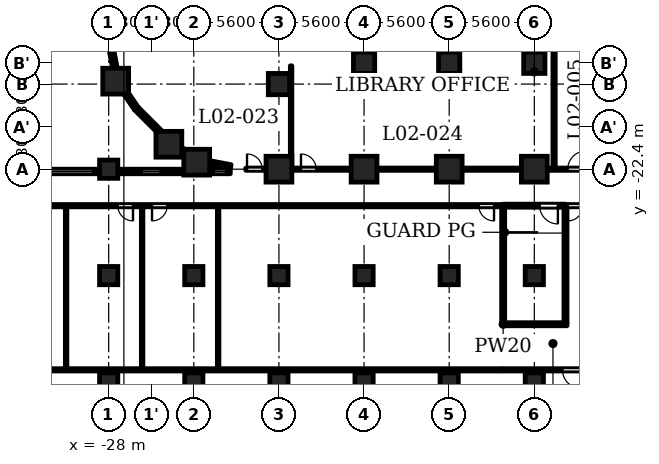
"""IFC4 building model, lengths in metres.
Left out: names, types, materials, properties, quantities, classifications, styles, units other than length and angle.
Written with IfcOpenShell. Run it as: python <this file> out.ifc"""

import sys

from ifc_helpers import new_model, si_unit, direction, frame, frame_2d, origin, origin_2d, place, context, subcontext, project, spatial, polyline, rectangle, circle, outline, extrude, element, fill, save


model = new_model("IFC4")
c1 = context("Model", 3, precision=1e-05, world=origin(), true_north=direction((0.0, 1.0)))
c2 = subcontext(c1, "Body", "Model", "MODEL_VIEW")
j1 = project(units=[si_unit("LENGTHUNIT", "METRE"), si_unit("PLANEANGLEUNIT", "RADIAN")], contexts=[c1])
p1 = place(None, origin())
s1 = spatial("IfcSite", under=j1, at=p1, CompositionType="ELEMENT")
p2 = place(p1, origin())
s2 = spatial("IfcBuilding", under=s1, at=p2, CompositionType="ELEMENT")
p3 = place(p2, frame((0.0, 0.0, 11.3)))
s3 = spatial("IfcBuildingStorey", under=s2, at=p3, CompositionType="ELEMENT", Elevation=11.3)
for number, where, z_axis, x_axis in (
    (1, (-22.209, -21.938, 0.0), (0.0, 0.0, 1.0), (1.0, 0.0, 0.0)),
    (2, (-16.8, -22.4, 0.0), (0.0, 0.0, 1.0), (1.0, 0.0, 0.0)),
    (3, (-11.2, -22.4, 0.0), (0.0, 0.0, 1.0), (1.0, 0.0, 0.0)),
    (4, (-5.6, -22.4, 0.0), (0.0, 0.0, 1.0), (1.0, 0.0, 0.0)),
    (5, (0.0, -22.4, 0.0), (0.0, 0.0, 1.0), (1.0, 0.0, 0.0)),
    (6, (-27.538, -16.609, 0.0), (0.0, 0.0, 1.0), (1.0, 0.0, 0.0)),
    (7, (-24.04, -20.76, 0.0), (0.0, 0.0, 1.0), (1.0, 0.0, 0.0)),
):
    element("IfcColumn", number, at=place(p3, frame(where, z_axis=z_axis, x_axis=x_axis)), inside=s3, PredefinedType="COLUMN", context=c2, shape_type="SweptSolid", body=[
        extrude(rectangle(XDim=1.7, YDim=1.7, at=origin_2d()), origin(), (0.0, 0.0, 1.0), 4.8),
    ])
for number, where, z_axis, x_axis in (
    (8, (-16.8, -16.8, 0.0), (0.0, 0.0, 1.0), (1.0, 0.0, 0.0)),
    (9, (-11.2, -15.4, 0.0), (0.0, 0.0, 1.0), (1.0, 0.0, 0.0)),
    (10, (-5.6, -15.4, 0.0), (0.0, 0.0, 1.0), (1.0, 0.0, 0.0)),
    (11, (0.0, -15.4, 0.0), (0.0, 0.0, 1.0), (1.0, 0.0, 0.0)),
):
    element("IfcColumn", number, at=place(p3, frame(where, z_axis=z_axis, x_axis=x_axis)), inside=s3, PredefinedType="COLUMN", context=c2, shape_type="SweptSolid", body=[
        extrude(rectangle(XDim=1.4, YDim=1.4, at=origin_2d()), origin(), (0.0, 0.0, 1.0), 4.8),
    ])
for number, where, z_axis, x_axis in (
    (12, (-28.0, -29.4, 0.0), (0.0, 0.0, 1.0), (1.0, 0.0, 0.0)),
    (13, (-22.4, -29.4, 0.0), (0.0, 0.0, 1.0), (1.0, 0.0, 0.0)),
    (14, (-16.8, -29.4, 0.0), (0.0, 0.0, 1.0), (1.0, 0.0, 0.0)),
    (15, (-11.2, -29.4, 0.0), (0.0, 0.0, 1.0), (1.0, 0.0, 0.0)),
    (16, (-5.6, -29.4, 0.0), (0.0, 0.0, 1.0), (1.0, 0.0, 0.0)),
    (17, (0.0, -29.4, 0.0), (0.0, 0.0, 1.0), (1.0, 0.0, 0.0)),
    (18, (-28.0, -36.4, 0.0), (0.0, 0.0, 1.0), (1.0, 0.0, 0.0)),
    (19, (-22.4, -36.4, 0.0), (0.0, 0.0, 1.0), (1.0, 0.0, 0.0)),
    (20, (-16.8, -36.4, 0.0), (0.0, 0.0, 1.0), (1.0, 0.0, 0.0)),
    (21, (-11.2, -36.4, 0.0), (0.0, 0.0, 1.0), (1.0, 0.0, 0.0)),
    (22, (-5.6, -36.4, 0.0), (0.0, 0.0, 1.0), (1.0, 0.0, 0.0)),
    (23, (0.0, -36.4, 0.0), (0.0, 0.0, 1.0), (1.0, 0.0, 0.0)),
    (24, (-28.0, -22.4, 0.0), (0.0, 0.0, 1.0), (1.0, 0.0, 0.0)),
):
    element("IfcColumn", number, at=place(p3, frame(where, z_axis=z_axis, x_axis=x_axis)), inside=s3, PredefinedType="COLUMN", context=c2, shape_type="SweptSolid", body=[
        extrude(circle(Radius=0.6, at=origin_2d()), origin(), (0.0, 0.0, 1.0), 4.8),
    ])
for number, where, z_axis, x_axis in (
    (25, (-27.853, -14.372, 0.0), (0.0, 0.0, 1.0), (0.187, -0.982, 0.0)),
    (26, (-26.969, -17.25, 0.0), (0.0, 0.0, 1.0), (0.562, -0.827, 0.0)),
):
    element("IfcWall", number, at=place(p3, frame(where, z_axis=z_axis, x_axis=x_axis)), inside=s3, PredefinedType="SOLIDWALL", context=c2, shape_type="SweptSolid", body=[
        extrude(rectangle(XDim=1.406, YDim=0.3, at=frame_2d((0.703, 0.0))), origin(), (0.0, 0.0, 1.0), 3.55),
    ])
p4 = place(p3, frame((-26.197, -18.391, 0.0), z_axis=(0.0, 0.0, 1.0), x_axis=(0.707054835785, -0.707158722772, 0.0)))
e27 = element("IfcWall", 27, at=p4, inside=s3, PredefinedType="SOLIDWALL", context=c2, shape_type="SweptSolid", body=[
    extrude(rectangle(XDim=2.35, YDim=0.3, at=frame_2d((1.175, 0.0))), origin(), (0.0, 0.0, 1.0), 3.55),
])
p5 = place(p3, frame((-23.244, -21.101, 0.0), z_axis=(0.0, 0.0, 1.0), x_axis=(0.827135885329, -0.562001981492, 0.0)))
e28 = element("IfcWall", 28, at=p5, inside=s3, PredefinedType="SOLIDWALL", context=c2, shape_type="SweptSolid", body=[
    extrude(rectangle(XDim=0.477, YDim=0.3, at=frame_2d((0.239, 0.0))), origin(), (0.0, 0.0, 1.0), 4.45),
])
p6 = place(p3, frame((-21.353, -21.989, 0.0), z_axis=(0.0, 0.0, 1.0), x_axis=(0.98229142023, -0.187359455971, 0.0)))
e29 = element("IfcWall", 29, at=p6, inside=s3, PredefinedType="SOLIDWALL", context=c2, shape_type="SweptSolid", body=[
    extrude(rectangle(XDim=1.406, YDim=0.3, at=frame_2d((0.703, 0.0))), origin(), (0.0, 0.0, 1.0), 3.55),
])
p7 = place(p3, frame((-20.0, -22.55, 0.0), z_axis=(0.0, 0.0, 1.0), x_axis=(-1.0, 0.0, 0.0)))
e30 = element("IfcWall", 30, at=p7, inside=s3, PredefinedType="SOLIDWALL", context=c2, shape_type="SweptSolid", body=[
    extrude(rectangle(XDim=1.359, YDim=0.3, at=frame_2d((0.679, 0.0))), origin(), (0.0, 0.0, 1.0), 3.55),
])
p8 = place(p7, frame((0.279, 0.0, 0.6)))
e31 = element("IfcOpeningElement", 31, at=p8, cuts=e30, PredefinedType="OPENING", context=c2, shape_type="SweptSolid", body=[
    extrude(rectangle(XDim=0.8, YDim=1.55, at=frame_2d((0.4, 0.775))), frame((0.0, 0.16, 0.0), z_axis=(0.0, -1.0, 0.0), x_axis=(1.0, 0.0, 0.0)), (0.0, 0.0, 1.0), 0.32),
])
p9 = place(p3, frame((-23.059, -22.55, 0.0), z_axis=(0.0, 0.0, 1.0), x_axis=(-1.0, 0.0, 0.0)))
e32 = element("IfcWall", 32, at=p9, inside=s3, PredefinedType="SOLIDWALL", context=c2, shape_type="SweptSolid", body=[
    extrude(rectangle(XDim=4.341, YDim=0.3, at=frame_2d((2.171, 0.0))), origin(), (0.0, 0.0, 1.0), 4.45),
])
p10 = place(p9, frame((1.571, 0.0, 0.6)))
e33 = element("IfcOpeningElement", 33, at=p10, cuts=e32, PredefinedType="OPENING", context=c2, shape_type="SweptSolid", body=[
    extrude(rectangle(XDim=1.2, YDim=1.55, at=frame_2d((0.6, 0.775))), frame((0.0, 0.16, 0.0), z_axis=(0.0, -1.0, 0.0), x_axis=(1.0, 0.0, 0.0)), (0.0, 0.0, 1.0), 0.32),
])
p11 = place(p3, frame((-28.6, -22.55, 0.0), z_axis=(0.0, 0.0, 1.0), x_axis=(-1.0, 0.0, 0.0)))
e34 = element("IfcWall", 34, at=p11, inside=s3, PredefinedType="SOLIDWALL", context=c2, shape_type="SweptSolid", body=[
    extrude(rectangle(XDim=4.4, YDim=0.3, at=frame_2d((2.2, 0.0))), origin(), (0.0, 0.0, 1.0), 4.45),
])
p12 = place(p11, frame((0.4, 0.0, 1.2)))
e35 = element("IfcOpeningElement", 35, at=p12, cuts=e34, PredefinedType="OPENING", context=c2, shape_type="SweptSolid", body=[
    extrude(rectangle(XDim=3.6, YDim=0.95, at=frame_2d((1.8, 0.475))), frame((0.0, 0.16, 0.0), z_axis=(0.0, -1.0, 0.0), x_axis=(1.0, 0.0, 0.0)), (0.0, 0.0, 1.0), 0.32),
])
p13 = place(p3, frame((-44.48, -35.6, 0.0), z_axis=(0.0, 0.0, 1.0), x_axis=(1.0, 0.0, 0.0)))
e36 = element("IfcWall", 36, at=p13, inside=s3, PredefinedType="PARTITIONING", context=c2, shape_type="SweptSolid", body=[
    extrude(rectangle(XDim=42.38, YDim=0.15, at=frame_2d((21.19, 0.0))), origin(), (0.0, 0.0, 1.0), 4.45),
])
p14 = place(p3, frame((-2.05, -35.6, 0.0), z_axis=(0.0, 0.0, 1.0), x_axis=(1.0, 0.0, 0.0)))
e37 = element("IfcWall", 37, at=p14, inside=s3, PredefinedType="PARTITIONING", context=c2, shape_type="SweptSolid", body=[
    extrude(rectangle(XDim=5.6, YDim=0.15, at=frame_2d((2.8, 0.0))), origin(), (0.0, 0.0, 1.0), 4.45),
])
p15 = place(p14, frame((3.9, 0.0, 0.0)))
e38 = element("IfcOpeningElement", 38, at=p15, cuts=e37, PredefinedType="OPENING", context=c2, shape_type="SweptSolid", body=[
    extrude(rectangle(XDim=1.2, YDim=2.1, at=frame_2d((0.6, 1.05))), frame((0.0, 0.085, 0.0), z_axis=(0.0, -1.0, 0.0), x_axis=(1.0, 0.0, 0.0)), (0.0, 0.0, 1.0), 0.17),
])
p16 = place(p3, frame((-2.05, -32.6, 0.0), z_axis=(0.0, 0.0, 1.0), x_axis=(1.0, 0.0, 0.0)))
e39 = element("IfcWall", 39, at=p16, inside=s3, PredefinedType="SHEAR", context=c2, shape_type="SweptSolid", body=[
    extrude(rectangle(XDim=4.2, YDim=0.2, at=frame_2d((2.1, 0.0))), origin(), (0.0, 0.0, 1.0), 4.45),
])
p17 = place(p3, frame((-37.0, -24.8, 0.0), z_axis=(0.0, 0.0, 1.0), x_axis=(1.0, 0.0, 0.0)))
e40 = element("IfcWall", 40, at=p17, inside=s3, PredefinedType="PARTITIONING", context=c2, shape_type="SweptSolid", body=[
    extrude(rectangle(XDim=34.9, YDim=0.15, at=frame_2d((17.45, 0.0))), origin(), (0.0, 0.0, 1.0), 4.45),
])
p18 = place(p17, frame((0.65, 0.0, 0.0)))
e41 = element("IfcOpeningElement", 41, at=p18, cuts=e40, PredefinedType="OPENING", context=c2, shape_type="SweptSolid", body=[
    extrude(rectangle(XDim=1.0, YDim=2.1, at=frame_2d((0.5, 1.05))), frame((0.0, 0.085, 0.0), z_axis=(0.0, -1.0, 0.0), x_axis=(1.0, 0.0, 0.0)), (0.0, 0.0, 1.0), 0.17),
])
p19 = place(p17, frame((9.6, 0.0, 0.0)))
e42 = element("IfcOpeningElement", 42, at=p19, cuts=e40, PredefinedType="OPENING", context=c2, shape_type="SweptSolid", body=[
    extrude(rectangle(XDim=1.0, YDim=2.1, at=frame_2d((0.5, 1.05))), frame((0.0, 0.085, 0.0), z_axis=(0.0, -1.0, 0.0), x_axis=(1.0, 0.0, 0.0)), (0.0, 0.0, 1.0), 0.17),
])
p20 = place(p17, frame((11.85, 0.0, 0.0)))
e43 = element("IfcOpeningElement", 43, at=p20, cuts=e40, PredefinedType="OPENING", context=c2, shape_type="SweptSolid", body=[
    extrude(rectangle(XDim=1.0, YDim=2.1, at=frame_2d((0.5, 1.05))), frame((0.0, 0.085, 0.0), z_axis=(0.0, -1.0, 0.0), x_axis=(1.0, 0.0, 0.0)), (0.0, 0.0, 1.0), 0.17),
])
p21 = place(p17, frame((33.35, 0.0, 0.0)))
e44 = element("IfcOpeningElement", 44, at=p21, cuts=e40, PredefinedType="OPENING", context=c2, shape_type="SweptSolid", body=[
    extrude(rectangle(XDim=1.0, YDim=2.1, at=frame_2d((0.5, 1.05))), frame((0.0, 0.085, 0.0), z_axis=(0.0, -1.0, 0.0), x_axis=(1.0, 0.0, 0.0)), (0.0, 0.0, 1.0), 0.17),
])
p22 = place(p3, frame((2.05, -24.8, 0.0), z_axis=(0.0, 0.0, 1.0), x_axis=(1.0, 0.0, 0.0)))
e45 = element("IfcWall", 45, at=p22, inside=s3, PredefinedType="PARTITIONING", context=c2, shape_type="SweptSolid", body=[
    extrude(rectangle(XDim=1.5, YDim=0.15, at=frame_2d((0.75, 0.0))), origin(), (0.0, 0.0, 1.0), 4.45),
])
p23 = place(p22, frame((0.15, 0.0, 0.0)))
e46 = element("IfcOpeningElement", 46, at=p23, cuts=e45, PredefinedType="OPENING", context=c2, shape_type="SweptSolid", body=[
    extrude(rectangle(XDim=1.0, YDim=2.1, at=frame_2d((0.5, 1.05))), frame((0.0, 0.085, 0.0), z_axis=(0.0, -1.0, 0.0), x_axis=(1.0, 0.0, 0.0)), (0.0, 0.0, 1.0), 0.17),
])
p24 = place(p3, frame((-2.05, -24.8, 0.0), z_axis=(0.0, 0.0, 1.0), x_axis=(1.0, 0.0, 0.0)))
e47 = element("IfcWall", 47, at=p24, inside=s3, PredefinedType="SHEAR", context=c2, shape_type="SweptSolid", body=[
    extrude(rectangle(XDim=4.1, YDim=0.2, at=frame_2d((2.05, 0.0))), origin(), (0.0, 0.0, 1.0), 4.45),
])
p25 = place(p24, frame((2.4, 0.0, 0.0)))
e48 = element("IfcOpeningElement", 48, at=p25, cuts=e47, PredefinedType="OPENING", context=c2, shape_type="SweptSolid", body=[
    extrude(rectangle(XDim=1.2, YDim=2.1, at=frame_2d((0.6, 1.05))), frame((0.0, 0.11, 0.0), z_axis=(0.0, -1.0, 0.0), x_axis=(1.0, 0.0, 0.0)), (0.0, 0.0, 1.0), 0.22),
])
p26 = place(p3, frame((-18.98, -22.4, 0.0), z_axis=(0.0, 0.0, 1.0), x_axis=(1.0, 0.0, 0.0)))
e49 = element("IfcWall", 49, at=p26, inside=s3, PredefinedType="PARTITIONING", context=c2, shape_type="SweptSolid", body=[
    extrude(rectangle(XDim=38.211, YDim=0.15, at=frame_2d((19.105, 0.0))), origin(), (0.0, 0.0, 1.0), 3.55),
])
p27 = place(p26, frame((21.18, 0.0, 0.0)))
e50 = element("IfcOpeningElement", 50, at=p27, cuts=e49, PredefinedType="OPENING", context=c2, shape_type="SweptSolid", body=[
    extrude(rectangle(XDim=1.2, YDim=2.1, at=frame_2d((0.6, 1.05))), frame((0.0, 0.085, 0.0), z_axis=(0.0, -1.0, 0.0), x_axis=(1.0, 0.0, 0.0)), (0.0, 0.0, 1.0), 0.17),
])
p28 = place(p26, frame((0.08, 0.0, 0.0)))
e51 = element("IfcOpeningElement", 51, at=p28, cuts=e49, PredefinedType="OPENING", context=c2, shape_type="SweptSolid", body=[
    extrude(rectangle(XDim=1.0, YDim=2.1, at=frame_2d((0.5, 1.05))), frame((0.0, 0.085, 0.0), z_axis=(0.0, -1.0, 0.0), x_axis=(1.0, 0.0, 0.0)), (0.0, 0.0, 1.0), 0.17),
])
p29 = place(p26, frame((3.63, 0.0, 0.0)))
e52 = element("IfcOpeningElement", 52, at=p29, cuts=e49, PredefinedType="OPENING", context=c2, shape_type="SweptSolid", body=[
    extrude(rectangle(XDim=1.0, YDim=2.1, at=frame_2d((0.5, 1.05))), frame((0.0, 0.085, 0.0), z_axis=(0.0, -1.0, 0.0), x_axis=(1.0, 0.0, 0.0)), (0.0, 0.0, 1.0), 0.17),
])
p30 = place(p26, frame((27.93, 0.0, 0.0)))
e53 = element("IfcOpeningElement", 53, at=p30, cuts=e49, PredefinedType="OPENING", context=c2, shape_type="SweptSolid", body=[
    extrude(rectangle(XDim=0.9, YDim=2.1, at=frame_2d((0.45, 1.05))), frame((0.0, 0.085, 0.0), z_axis=(0.0, -1.0, 0.0), x_axis=(1.0, 0.0, 0.0)), (0.0, 0.0, 1.0), 0.17),
])
p31 = place(p26, frame((31.18, 0.0, 0.0)))
e54 = element("IfcOpeningElement", 54, at=p31, cuts=e49, PredefinedType="OPENING", context=c2, shape_type="SweptSolid", body=[
    extrude(rectangle(XDim=0.9, YDim=2.1, at=frame_2d((0.45, 1.05))), frame((0.0, 0.085, 0.0), z_axis=(0.0, -1.0, 0.0), x_axis=(1.0, 0.0, 0.0)), (0.0, 0.0, 1.0), 0.17),
])
p32 = place(p26, frame((33.88, 0.0, 0.0)))
e55 = element("IfcOpeningElement", 55, at=p32, cuts=e49, PredefinedType="OPENING", context=c2, shape_type="SweptSolid", body=[
    extrude(rectangle(XDim=0.9, YDim=2.1, at=frame_2d((0.45, 1.05))), frame((0.0, 0.085, 0.0), z_axis=(0.0, -1.0, 0.0), x_axis=(1.0, 0.0, 0.0)), (0.0, 0.0, 1.0), 0.17),
])
p33 = place(p26, frame((37.231, 0.0, 0.0)))
e56 = element("IfcOpeningElement", 56, at=p33, cuts=e49, PredefinedType="OPENING", context=c2, shape_type="SweptSolid", body=[
    extrude(rectangle(XDim=0.9, YDim=2.1, at=frame_2d((0.45, 1.05))), frame((0.0, 0.085, 0.0), z_axis=(0.0, -1.0, 0.0), x_axis=(1.0, 0.0, 0.0)), (0.0, 0.0, 1.0), 0.17),
])
for number, where, z_axis, x_axis in (
    (57, (-30.8, -35.525, 0.0), (0.0, 0.0, 1.0), (0.0, 1.0, 0.0)),
    (58, (-25.8, -35.525, 0.0), (0.0, 0.0, 1.0), (0.0, 1.0, 0.0)),
    (59, (-20.8, -35.525, 0.0), (0.0, 0.0, 1.0), (0.0, 1.0, 0.0)),
):
    element("IfcWall", number, at=place(p3, frame(where, z_axis=z_axis, x_axis=x_axis)), inside=s3, PredefinedType="PARTITIONING", context=c2, shape_type="SweptSolid", body=[
        extrude(rectangle(XDim=10.65, YDim=0.1, at=frame_2d((5.325, 0.0))), origin(), (0.0, 0.0, 1.0), 4.45),
    ])
p34 = place(p3, frame((-16.0, -22.325, 0.0), z_axis=(0.0, 0.0, 1.0), x_axis=(0.0, 1.0, 0.0)))
e60 = element("IfcWall", 60, at=p34, inside=s3, PredefinedType="PARTITIONING", context=c2, shape_type="SweptSolid", body=[
    extrude(rectangle(XDim=6.725, YDim=0.1, at=frame_2d((3.362, 0.0))), origin(), (0.0, 0.0, 1.0), 4.45),
])
p35 = place(p3, frame((1.3, -22.325, 0.0), z_axis=(0.0, 0.0, 1.0), x_axis=(0.0, 1.0, 0.0)))
e61 = element("IfcWall", 61, at=p35, inside=s3, PredefinedType="PARTITIONING", context=c2, shape_type="SweptSolid", body=[
    extrude(rectangle(XDim=9.05, YDim=0.15, at=frame_2d((4.525, 0.0))), origin(), (0.0, 0.0, 1.0), 4.45),
])
p36 = place(p3, frame((2.05, -32.5, 0.0), z_axis=(0.0, 0.0, 1.0), x_axis=(0.0, 1.0, 0.0)))
e62 = element("IfcWall", 62, at=p36, inside=s3, PredefinedType="SHEAR", context=c2, shape_type="SweptSolid", body=[
    extrude(rectangle(XDim=7.625, YDim=0.2, at=frame_2d((3.812, 0.0))), origin(), (0.0, 0.0, 1.0), 4.45),
])
p37 = place(p3, frame((-2.05, -32.5, 0.0), z_axis=(0.0, 0.0, 1.0), x_axis=(0.0, 1.0, 0.0)))
e63 = element("IfcWall", 63, at=p37, inside=s3, PredefinedType="SHEAR", context=c2, shape_type="SweptSolid", body=[
    extrude(rectangle(XDim=7.6, YDim=0.2, at=frame_2d((3.8, 0.0))), origin(), (0.0, 0.0, 1.0), 4.45),
])
p38 = place(p3, origin())
e64 = element("IfcWall", 64, at=p38, inside=s3, PredefinedType="SOLIDWALL", context=c2, shape_type="SweptSolid", body=[
    extrude(outline(polyline([(-20.0, -22.7), (-19.0, -22.7), (-19.0, -22.285), (-19.944, -22.105), (-20.0, -22.4), (-20.0, -22.7)])), origin(), (0.0, 0.0, 1.0), 3.55),
])
p39 = place(p27, origin())
e65 = element("IfcDoor", 65, at=p39, inside=s3, OperationType="SINGLE_SWING_LEFT", PredefinedType="DOOR", context=c2, shape_type="SweptSolid", body=[
    extrude(rectangle(XDim=1.2, YDim=2.1, at=frame_2d((0.6, 1.05))), frame((0.0, 0.025, 0.0), z_axis=(0.0, -1.0, 0.0), x_axis=(1.0, 0.0, 0.0)), (0.0, 0.0, 1.0), 0.05),
])
fill(e50, e65)
p40 = place(p25, origin())
e66 = element("IfcDoor", 66, at=p40, inside=s3, OperationType="SINGLE_SWING_RIGHT", PredefinedType="DOOR", context=c2, shape_type="SweptSolid", body=[
    extrude(rectangle(XDim=1.2, YDim=2.1, at=frame_2d((0.6, 1.05))), frame((0.0, 0.025, 0.0), z_axis=(0.0, -1.0, 0.0), x_axis=(1.0, 0.0, 0.0)), (0.0, 0.0, 1.0), 0.05),
])
fill(e48, e66)
p41 = place(p23, origin())
e67 = element("IfcDoor", 67, at=p41, inside=s3, OperationType="SINGLE_SWING_LEFT", PredefinedType="DOOR", context=c2, shape_type="SweptSolid", body=[
    extrude(rectangle(XDim=1.0, YDim=2.1, at=frame_2d((0.5, 1.05))), frame((0.0, 0.025, 0.0), z_axis=(0.0, -1.0, 0.0), x_axis=(1.0, 0.0, 0.0)), (0.0, 0.0, 1.0), 0.05),
])
fill(e46, e67)
p42 = place(p15, origin())
e68 = element("IfcDoor", 68, at=p42, inside=s3, OperationType="SINGLE_SWING_RIGHT", PredefinedType="DOOR", context=c2, shape_type="SweptSolid", body=[
    extrude(rectangle(XDim=1.2, YDim=2.1, at=frame_2d((0.6, 1.05))), frame((0.0, 0.025, 0.0), z_axis=(0.0, -1.0, 0.0), x_axis=(1.0, 0.0, 0.0)), (0.0, 0.0, 1.0), 0.05),
])
fill(e38, e68)
p43 = place(p19, origin())
e69 = element("IfcDoor", 69, at=p43, inside=s3, OperationType="SINGLE_SWING_RIGHT", PredefinedType="DOOR", context=c2, shape_type="SweptSolid", body=[
    extrude(rectangle(XDim=1.0, YDim=2.1, at=frame_2d((0.5, 1.05))), frame((0.0, 0.025, 0.0), z_axis=(0.0, -1.0, 0.0), x_axis=(1.0, 0.0, 0.0)), (0.0, 0.0, 1.0), 0.05),
])
fill(e42, e69)
p44 = place(p20, origin())
e70 = element("IfcDoor", 70, at=p44, inside=s3, OperationType="SINGLE_SWING_LEFT", PredefinedType="DOOR", context=c2, shape_type="SweptSolid", body=[
    extrude(rectangle(XDim=1.0, YDim=2.1, at=frame_2d((0.5, 1.05))), frame((0.0, 0.025, 0.0), z_axis=(0.0, -1.0, 0.0), x_axis=(1.0, 0.0, 0.0)), (0.0, 0.0, 1.0), 0.05),
])
fill(e43, e70)
p45 = place(p21, origin())
e71 = element("IfcDoor", 71, at=p45, inside=s3, OperationType="SINGLE_SWING_RIGHT", PredefinedType="DOOR", context=c2, shape_type="SweptSolid", body=[
    extrude(rectangle(XDim=1.0, YDim=2.1, at=frame_2d((0.5, 1.05))), frame((0.0, 0.025, 0.0), z_axis=(0.0, -1.0, 0.0), x_axis=(1.0, 0.0, 0.0)), (0.0, 0.0, 1.0), 0.05),
])
fill(e44, e71)
p46 = place(p28, origin())
e72 = element("IfcDoor", 72, at=p46, inside=s3, OperationType="SINGLE_SWING_RIGHT", PredefinedType="DOOR", context=c2, shape_type="SweptSolid", body=[
    extrude(rectangle(XDim=1.0, YDim=2.1, at=frame_2d((0.5, 1.05))), frame((0.0, 0.025, 0.0), z_axis=(0.0, -1.0, 0.0), x_axis=(1.0, 0.0, 0.0)), (0.0, 0.0, 1.0), 0.05),
])
fill(e51, e72)
p47 = place(p29, origin())
e73 = element("IfcDoor", 73, at=p47, inside=s3, OperationType="SINGLE_SWING_RIGHT", PredefinedType="DOOR", context=c2, shape_type="SweptSolid", body=[
    extrude(rectangle(XDim=1.0, YDim=2.1, at=frame_2d((0.5, 1.05))), frame((0.0, 0.025, 0.0), z_axis=(0.0, -1.0, 0.0), x_axis=(1.0, 0.0, 0.0)), (0.0, 0.0, 1.0), 0.05),
])
fill(e52, e73)
p48 = place(p8, origin())
e74 = element("IfcWindow", 74, at=p48, inside=s3, PartitioningType="SINGLE_PANEL", PredefinedType="WINDOW", context=c2, shape_type="SweptSolid", body=[
    extrude(rectangle(XDim=0.8, YDim=1.55, at=frame_2d((0.4, 0.775))), frame((0.0, 0.03, 0.0), z_axis=(0.0, -1.0, 0.0), x_axis=(1.0, 0.0, 0.0)), (0.0, 0.0, 1.0), 0.06),
])
fill(e31, e74)
p49 = place(p10, origin())
e75 = element("IfcWindow", 75, at=p49, inside=s3, PartitioningType="SINGLE_PANEL", PredefinedType="WINDOW", context=c2, shape_type="SweptSolid", body=[
    extrude(rectangle(XDim=1.2, YDim=1.55, at=frame_2d((0.6, 0.775))), frame((0.0, 0.03, 0.0), z_axis=(0.0, -1.0, 0.0), x_axis=(1.0, 0.0, 0.0)), (0.0, 0.0, 1.0), 0.06),
])
fill(e33, e75)
p50 = place(p12, origin())
e76 = element("IfcWindow", 76, at=p50, inside=s3, PartitioningType="SINGLE_PANEL", PredefinedType="WINDOW", context=c2, shape_type="SweptSolid", body=[
    extrude(rectangle(XDim=3.6, YDim=0.95, at=frame_2d((1.8, 0.475))), frame((0.0, 0.03, 0.0), z_axis=(0.0, -1.0, 0.0), x_axis=(1.0, 0.0, 0.0)), (0.0, 0.0, 1.0), 0.06),
])
fill(e35, e76)
save(model, sys.argv[1])
